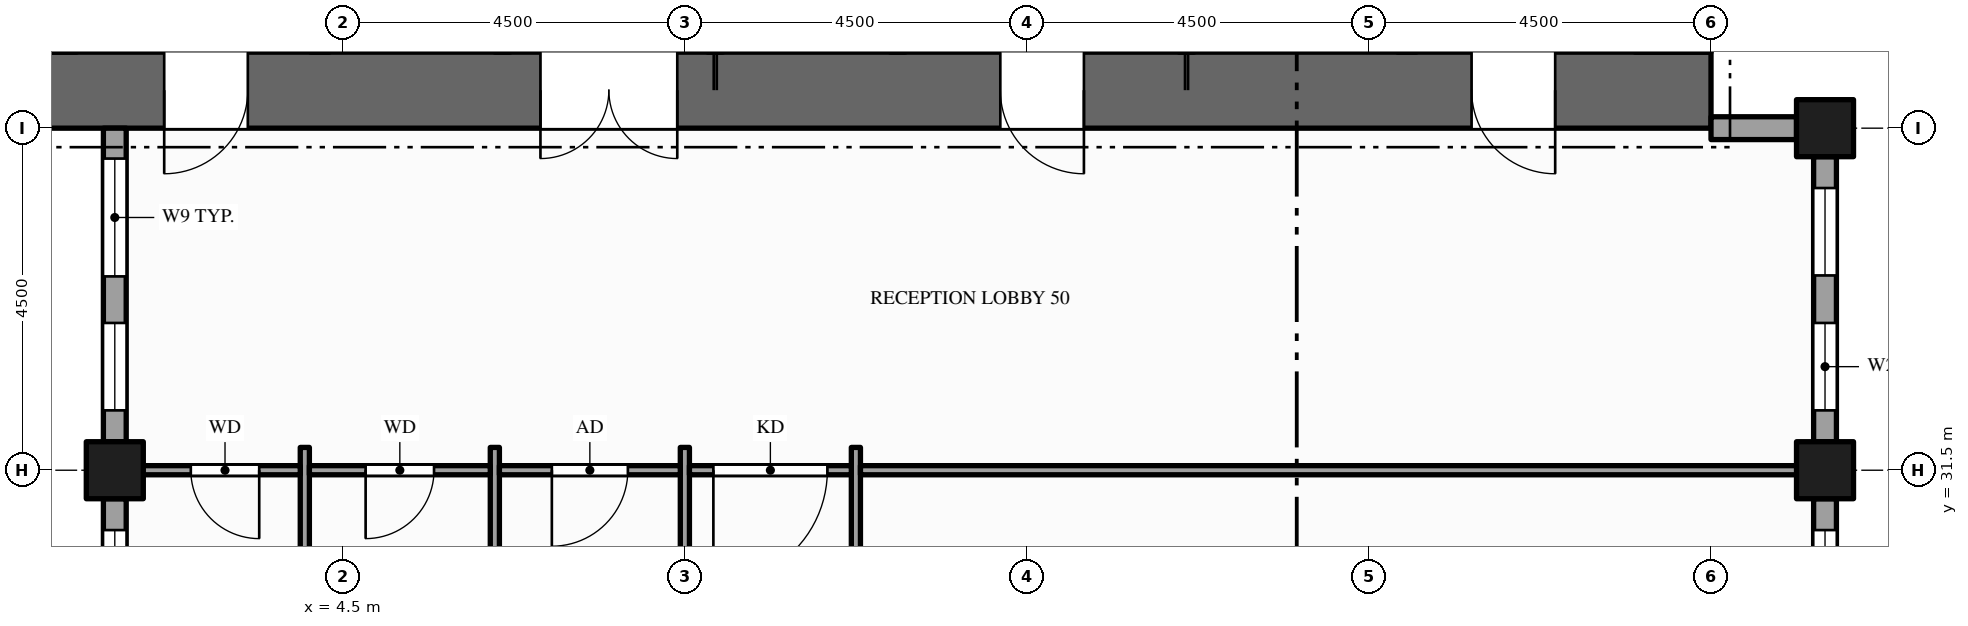
"""IFC4 building model, lengths in metres.
Left out: names, types, materials, properties, quantities, classifications, styles, units other than length and angle.
Written with IfcOpenShell. Run it as: python <this file> out.ifc"""

import sys

from ifc_helpers import new_model, si_unit, direction, frame, frame_2d, origin, origin_2d, place, context, subcontext, project, spatial, rectangle, hollow_rectangle, extrude, element, fill, save


model = new_model("IFC4")
c1 = context("Model", 3, precision=1e-05, world=origin(), true_north=direction((0.0, 1.0)))
c2 = subcontext(c1, "Body", "Model", "MODEL_VIEW")
j1 = project(units=[si_unit("LENGTHUNIT", "METRE"), si_unit("PLANEANGLEUNIT", "RADIAN")], contexts=[c1])
p1 = place(None, origin())
s1 = spatial("IfcSite", under=j1, at=p1, CompositionType="ELEMENT")
p2 = place(p1, origin())
s2 = spatial("IfcBuilding", under=s1, at=p2, CompositionType="ELEMENT")
p3 = place(p2, frame((0.0, 0.0, 215.0)))
s3 = spatial("IfcBuildingStorey", under=s2, at=p3, CompositionType="ELEMENT", Elevation=215.0)
p4 = place(p3, frame((0.0, 36.5, -0.15), z_axis=(0.0, 0.0, 1.0), x_axis=(1.0, 0.0, 0.0)))
e1 = element("IfcWall", 1, at=p4, inside=s3, PredefinedType="SHEAR", context=c2, shape_type="SweptSolid", body=[
    extrude(rectangle(XDim=22.5, YDim=1.0, at=frame_2d((11.25, 0.0))), origin(), (0.0, 0.0, 1.0), 4.0),
])
p5 = place(p4, frame((7.1, 0.0, 0.15)))
e2 = element("IfcOpeningElement", 2, at=p5, cuts=e1, PredefinedType="OPENING", context=c2, shape_type="SweptSolid", body=[
    extrude(rectangle(XDim=1.8, YDim=2.1, at=frame_2d((0.9, 1.05))), frame((0.0, 0.51, 0.0), z_axis=(0.0, -1.0, 0.0), x_axis=(1.0, 0.0, 0.0)), (0.0, 0.0, 1.0), 1.02),
])
p6 = place(p4, frame((13.15, 0.0, 0.15)))
e3 = element("IfcOpeningElement", 3, at=p6, cuts=e1, PredefinedType="OPENING", context=c2, shape_type="SweptSolid", body=[
    extrude(rectangle(XDim=1.1, YDim=2.1, at=frame_2d((0.55, 1.05))), frame((0.0, 0.51, 0.0), z_axis=(0.0, -1.0, 0.0), x_axis=(1.0, 0.0, 0.0)), (0.0, 0.0, 1.0), 1.02),
])
p7 = place(p4, frame((2.15, 0.0, 0.15)))
e4 = element("IfcOpeningElement", 4, at=p7, cuts=e1, PredefinedType="OPENING", context=c2, shape_type="SweptSolid", body=[
    extrude(rectangle(XDim=1.1, YDim=2.1, at=frame_2d((0.55, 1.05))), frame((0.0, 0.51, 0.0), z_axis=(0.0, -1.0, 0.0), x_axis=(1.0, 0.0, 0.0)), (0.0, 0.0, 1.0), 1.02),
])
p8 = place(p4, frame((19.35, 0.0, 0.15)))
e5 = element("IfcOpeningElement", 5, at=p8, cuts=e1, PredefinedType="OPENING", context=c2, shape_type="SweptSolid", body=[
    extrude(rectangle(XDim=1.1, YDim=2.1, at=frame_2d((0.55, 1.05))), frame((0.0, 0.51, 0.0), z_axis=(0.0, -1.0, 0.0), x_axis=(1.0, 0.0, 0.0)), (0.0, 0.0, 1.0), 1.02),
])
for number, where, z_axis, x_axis in (
    (6, (1.5, 31.5, -0.15), (0.0, 0.0, 1.0), (1.0, 0.0, 0.0)),
    (7, (24.0, 31.5, -0.15), (0.0, 0.0, 1.0), (1.0, 0.0, 0.0)),
    (8, (24.0, 36.0, -0.15), (0.0, 0.0, 1.0), (1.0, 0.0, 0.0)),
):
    element("IfcColumn", number, at=place(p3, frame(where, z_axis=z_axis, x_axis=x_axis)), inside=s3, PredefinedType="COLUMN", context=c2, shape_type="SweptSolid", body=[
        extrude(hollow_rectangle(XDim=0.75, YDim=0.75, WallThickness=0.036, at=origin_2d()), origin(), (0.0, 0.0, 1.0), 4.0),
    ])
p9 = place(p3, frame((24.0, 25.875, 0.0), z_axis=(0.0, 0.0, 1.0), x_axis=(0.0, 1.0, 0.0)))
e9 = element("IfcWall", 9, at=p9, inside=s3, PredefinedType="STANDARD", context=c2, shape_type="SweptSolid", body=[
    extrude(rectangle(XDim=5.25, YDim=0.3, at=frame_2d((2.625, 0.0))), origin(), (0.0, 0.0, 1.0), 3.157),
])
p10 = place(p9, frame((1.425, 0.0, 0.9)))
e10 = element("IfcOpeningElement", 10, at=p10, cuts=e9, PredefinedType="OPENING", context=c2, shape_type="SweptSolid", body=[
    extrude(rectangle(XDim=1.65, YDim=2.0, at=frame_2d((0.825, 1.0))), frame((0.0, 0.16, 0.0), z_axis=(0.0, -1.0, 0.0), x_axis=(1.0, 0.0, 0.0)), (0.0, 0.0, 1.0), 0.32),
])
p11 = place(p9, frame((3.688, 0.0, 0.9)))
e11 = element("IfcOpeningElement", 11, at=p11, cuts=e9, PredefinedType="OPENING", context=c2, shape_type="SweptSolid", body=[
    extrude(rectangle(XDim=1.15, YDim=2.0, at=frame_2d((0.575, 1.0))), frame((0.0, 0.16, 0.0), z_axis=(0.0, -1.0, 0.0), x_axis=(1.0, 0.0, 0.0)), (0.0, 0.0, 1.0), 0.32),
])
p12 = place(p3, frame((24.0, 31.875, 0.0), z_axis=(0.0, 0.0, 1.0), x_axis=(0.0, 1.0, 0.0)))
e12 = element("IfcWall", 12, at=p12, inside=s3, PredefinedType="STANDARD", context=c2, shape_type="SweptSolid", body=[
    extrude(rectangle(XDim=3.75, YDim=0.3, at=frame_2d((1.875, 0.0))), origin(), (0.0, 0.0, 1.0), 3.157),
])
p13 = place(p12, frame((0.413, 0.0, 0.9)))
e13 = element("IfcOpeningElement", 13, at=p13, cuts=e12, PredefinedType="OPENING", context=c2, shape_type="SweptSolid", body=[
    extrude(rectangle(XDim=1.15, YDim=2.0, at=frame_2d((0.575, 1.0))), frame((0.0, 0.16, 0.0), z_axis=(0.0, -1.0, 0.0), x_axis=(1.0, 0.0, 0.0)), (0.0, 0.0, 1.0), 0.32),
])
p14 = place(p12, frame((2.188, 0.0, 0.9)))
e14 = element("IfcOpeningElement", 14, at=p14, cuts=e12, PredefinedType="OPENING", context=c2, shape_type="SweptSolid", body=[
    extrude(rectangle(XDim=1.15, YDim=2.0, at=frame_2d((0.575, 1.0))), frame((0.0, 0.16, 0.0), z_axis=(0.0, -1.0, 0.0), x_axis=(1.0, 0.0, 0.0)), (0.0, 0.0, 1.0), 0.32),
])
p15 = place(p3, frame((23.625, 36.0, 0.0), z_axis=(0.0, 0.0, 1.0), x_axis=(-1.0, 0.0, 0.0)))
e15 = element("IfcWall", 15, at=p15, inside=s3, PredefinedType="STANDARD", context=c2, shape_type="SweptSolid", body=[
    extrude(rectangle(XDim=1.125, YDim=0.3, at=frame_2d((0.562, 0.0))), origin(), (0.0, 0.0, 1.0), 2.87),
])
p16 = place(p3, frame((1.5, 36.0, 0.0), z_axis=(0.0, 0.0, 1.0), x_axis=(0.0, -1.0, 0.0)))
e16 = element("IfcWall", 16, at=p16, inside=s3, PredefinedType="STANDARD", context=c2, shape_type="SweptSolid", body=[
    extrude(rectangle(XDim=4.125, YDim=0.3, at=frame_2d((2.062, 0.0))), origin(), (0.0, 0.0, 1.0), 3.157),
])
p17 = place(p16, frame((0.4, 0.0, 0.9)))
e17 = element("IfcOpeningElement", 17, at=p17, cuts=e16, PredefinedType="OPENING", context=c2, shape_type="SweptSolid", body=[
    extrude(rectangle(XDim=1.55, YDim=2.0, at=frame_2d((0.775, 1.0))), frame((0.0, 0.16, 0.0), z_axis=(0.0, -1.0, 0.0), x_axis=(1.0, 0.0, 0.0)), (0.0, 0.0, 1.0), 0.32),
])
p18 = place(p16, frame((2.562, 0.0, 0.9)))
e18 = element("IfcOpeningElement", 18, at=p18, cuts=e16, PredefinedType="OPENING", context=c2, shape_type="SweptSolid", body=[
    extrude(rectangle(XDim=1.15, YDim=2.0, at=frame_2d((0.575, 1.0))), frame((0.0, 0.16, 0.0), z_axis=(0.0, -1.0, 0.0), x_axis=(1.0, 0.0, 0.0)), (0.0, 0.0, 1.0), 0.32),
])
p19 = place(p3, frame((1.5, 31.125, 0.0), z_axis=(0.0, 0.0, 1.0), x_axis=(0.0, -1.0, 0.0)))
e19 = element("IfcWall", 19, at=p19, inside=s3, PredefinedType="STANDARD", context=c2, shape_type="SweptSolid", body=[
    extrude(rectangle(XDim=3.75, YDim=0.3, at=frame_2d((1.875, 0.0))), origin(), (0.0, 0.0, 1.0), 3.157),
])
p20 = place(p19, frame((0.413, 0.0, 0.9)))
e20 = element("IfcOpeningElement", 20, at=p20, cuts=e19, PredefinedType="OPENING", context=c2, shape_type="SweptSolid", body=[
    extrude(rectangle(XDim=1.15, YDim=2.0, at=frame_2d((0.575, 1.0))), frame((0.0, 0.16, 0.0), z_axis=(0.0, -1.0, 0.0), x_axis=(1.0, 0.0, 0.0)), (0.0, 0.0, 1.0), 0.32),
])
p21 = place(p19, frame((2.188, 0.0, 0.9)))
e21 = element("IfcOpeningElement", 21, at=p21, cuts=e19, PredefinedType="OPENING", context=c2, shape_type="SweptSolid", body=[
    extrude(rectangle(XDim=1.15, YDim=2.0, at=frame_2d((0.575, 1.0))), frame((0.0, 0.16, 0.0), z_axis=(0.0, -1.0, 0.0), x_axis=(1.0, 0.0, 0.0)), (0.0, 0.0, 1.0), 0.32),
])
for number, where, z_axis, x_axis in (
    (22, (4.0, 26.7, 0.0), (0.0, 0.0, 1.0), (0.0, 1.0, 0.0)),
    (23, (6.5, 26.7, 0.0), (0.0, 0.0, 1.0), (0.0, 1.0, 0.0)),
):
    element("IfcWall", number, at=place(p3, frame(where, z_axis=z_axis, x_axis=x_axis)), inside=s3, PredefinedType="PARTITIONING", context=c2, shape_type="SweptSolid", body=[
        extrude(rectangle(XDim=5.1, YDim=0.12, at=frame_2d((2.55, 0.0))), origin(), (0.0, 0.0, 1.0), 3.85),
    ])
p22 = place(p3, frame((9.0, 8.7, 0.0), z_axis=(0.0, 0.0, 1.0), x_axis=(0.0, 1.0, 0.0)))
e24 = element("IfcWall", 24, at=p22, inside=s3, PredefinedType="PARTITIONING", context=c2, shape_type="SweptSolid", body=[
    extrude(rectangle(XDim=23.1, YDim=0.12, at=frame_2d((11.55, 0.0))), origin(), (0.0, 0.0, 1.0), 2.6),
])
p23 = place(p22, frame((2.05, 0.0, 0.0)))
e25 = element("IfcOpeningElement", 25, at=p23, cuts=e24, PredefinedType="OPENING", context=c2, shape_type="SweptSolid", body=[
    extrude(rectangle(XDim=1.0, YDim=2.1, at=frame_2d((0.5, 1.05))), frame((0.0, 0.07, 0.0), z_axis=(0.0, -1.0, 0.0), x_axis=(1.0, 0.0, 0.0)), (0.0, 0.0, 1.0), 0.14),
])
p24 = place(p22, frame((7.675, 0.0, 0.0)))
e26 = element("IfcOpeningElement", 26, at=p24, cuts=e24, PredefinedType="OPENING", context=c2, shape_type="SweptSolid", body=[
    extrude(rectangle(XDim=1.0, YDim=2.1, at=frame_2d((0.5, 1.05))), frame((0.0, 0.07, 0.0), z_axis=(0.0, -1.0, 0.0), x_axis=(1.0, 0.0, 0.0)), (0.0, 0.0, 1.0), 0.14),
])
p25 = place(p22, frame((14.455, 0.0, 0.0)))
e27 = element("IfcOpeningElement", 27, at=p25, cuts=e24, PredefinedType="OPENING", context=c2, shape_type="SweptSolid", body=[
    extrude(rectangle(XDim=1.0, YDim=2.1, at=frame_2d((0.5, 1.05))), frame((0.0, 0.07, 0.0), z_axis=(0.0, -1.0, 0.0), x_axis=(1.0, 0.0, 0.0)), (0.0, 0.0, 1.0), 0.14),
])
p26 = place(p3, frame((11.25, 8.7, 0.0), z_axis=(0.0, 0.0, 1.0), x_axis=(0.0, 1.0, 0.0)))
e28 = element("IfcWall", 28, at=p26, inside=s3, PredefinedType="PARTITIONING", context=c2, shape_type="SweptSolid", body=[
    extrude(rectangle(XDim=23.1, YDim=0.12, at=frame_2d((11.55, 0.0))), origin(), (0.0, 0.0, 1.0), 2.6),
])
p27 = place(p26, frame((18.825, 0.0, 0.0)))
e29 = element("IfcOpeningElement", 29, at=p27, cuts=e28, PredefinedType="OPENING", context=c2, shape_type="SweptSolid", body=[
    extrude(rectangle(XDim=1.2, YDim=2.1, at=frame_2d((0.6, 1.05))), frame((0.0, 0.07, 0.0), z_axis=(0.0, -1.0, 0.0), x_axis=(1.0, 0.0, 0.0)), (0.0, 0.0, 1.0), 0.14),
])
p28 = place(p26, frame((4.2, 0.0, 0.0)))
e30 = element("IfcOpeningElement", 30, at=p28, cuts=e28, PredefinedType="OPENING", context=c2, shape_type="SweptSolid", body=[
    extrude(rectangle(XDim=1.2, YDim=2.1, at=frame_2d((0.6, 1.05))), frame((0.0, 0.07, 0.0), z_axis=(0.0, -1.0, 0.0), x_axis=(1.0, 0.0, 0.0)), (0.0, 0.0, 1.0), 0.14),
])
p29 = place(p3, frame((1.65, 31.5, 0.0), z_axis=(0.0, 0.0, 1.0), x_axis=(1.0, 0.0, 0.0)))
e31 = element("IfcWall", 31, at=p29, inside=s3, PredefinedType="PARTITIONING", context=c2, shape_type="SweptSolid", body=[
    extrude(rectangle(XDim=2.29, YDim=0.12, at=frame_2d((1.145, 0.0))), origin(), (0.0, 0.0, 1.0), 2.87),
])
p30 = place(p29, frame((0.85, 0.0, 0.0)))
e32 = element("IfcOpeningElement", 32, at=p30, cuts=e31, PredefinedType="OPENING", context=c2, shape_type="SweptSolid", body=[
    extrude(rectangle(XDim=0.9, YDim=2.1, at=frame_2d((0.45, 1.05))), frame((0.0, 0.07, 0.0), z_axis=(0.0, -1.0, 0.0), x_axis=(1.0, 0.0, 0.0)), (0.0, 0.0, 1.0), 0.14),
])
p31 = place(p3, frame((4.06, 31.5, 0.0), z_axis=(0.0, 0.0, 1.0), x_axis=(1.0, 0.0, 0.0)))
e33 = element("IfcWall", 33, at=p31, inside=s3, PredefinedType="PARTITIONING", context=c2, shape_type="SweptSolid", body=[
    extrude(rectangle(XDim=2.38, YDim=0.12, at=frame_2d((1.19, 0.0))), origin(), (0.0, 0.0, 1.0), 2.87),
])
p32 = place(p31, frame((0.74, 0.0, 0.0)))
e34 = element("IfcOpeningElement", 34, at=p32, cuts=e33, PredefinedType="OPENING", context=c2, shape_type="SweptSolid", body=[
    extrude(rectangle(XDim=0.9, YDim=2.1, at=frame_2d((0.45, 1.05))), frame((0.0, 0.07, 0.0), z_axis=(0.0, -1.0, 0.0), x_axis=(1.0, 0.0, 0.0)), (0.0, 0.0, 1.0), 0.14),
])
p33 = place(p3, frame((6.56, 31.5, 0.0), z_axis=(0.0, 0.0, 1.0), x_axis=(1.0, 0.0, 0.0)))
e35 = element("IfcWall", 35, at=p33, inside=s3, PredefinedType="PARTITIONING", context=c2, shape_type="SweptSolid", body=[
    extrude(rectangle(XDim=2.38, YDim=0.12, at=frame_2d((1.19, 0.0))), origin(), (0.0, 0.0, 1.0), 2.87),
])
p34 = place(p33, frame((0.69, 0.0, 0.0)))
e36 = element("IfcOpeningElement", 36, at=p34, cuts=e35, PredefinedType="OPENING", context=c2, shape_type="SweptSolid", body=[
    extrude(rectangle(XDim=1.0, YDim=2.1, at=frame_2d((0.5, 1.05))), frame((0.0, 0.07, 0.0), z_axis=(0.0, -1.0, 0.0), x_axis=(1.0, 0.0, 0.0)), (0.0, 0.0, 1.0), 0.14),
])
p35 = place(p3, frame((9.06, 31.5, 0.0), z_axis=(0.0, 0.0, 1.0), x_axis=(1.0, 0.0, 0.0)))
e37 = element("IfcWall", 37, at=p35, inside=s3, PredefinedType="PARTITIONING", context=c2, shape_type="SweptSolid", body=[
    extrude(rectangle(XDim=2.13, YDim=0.12, at=frame_2d((1.065, 0.0))), origin(), (0.0, 0.0, 1.0), 2.87),
])
p36 = place(p35, frame((0.315, 0.0, 0.0)))
e38 = element("IfcOpeningElement", 38, at=p36, cuts=e37, PredefinedType="OPENING", context=c2, shape_type="SweptSolid", body=[
    extrude(rectangle(XDim=1.5, YDim=2.1, at=frame_2d((0.75, 1.05))), frame((0.0, 0.07, 0.0), z_axis=(0.0, -1.0, 0.0), x_axis=(1.0, 0.0, 0.0)), (0.0, 0.0, 1.0), 0.14),
])
p37 = place(p3, frame((11.31, 31.5, 0.0), z_axis=(0.0, 0.0, 1.0), x_axis=(1.0, 0.0, 0.0)))
e39 = element("IfcWall", 39, at=p37, inside=s3, PredefinedType="PARTITIONING", context=c2, shape_type="SweptSolid", body=[
    extrude(rectangle(XDim=12.54, YDim=0.12, at=frame_2d((6.27, 0.0))), origin(), (0.0, 0.0, 1.0), 2.87),
])
p38 = place(p11, origin())
e40 = element("IfcWindow", 40, at=p38, inside=s3, PartitioningType="SINGLE_PANEL", PredefinedType="WINDOW", context=c2, shape_type="SweptSolid", body=[
    extrude(rectangle(XDim=1.15, YDim=2.0, at=frame_2d((0.575, 1.0))), frame((0.0, 0.03, 0.0), z_axis=(0.0, -1.0, 0.0), x_axis=(1.0, 0.0, 0.0)), (0.0, 0.0, 1.0), 0.06),
])
fill(e11, e40)
p39 = place(p13, origin())
e41 = element("IfcWindow", 41, at=p39, inside=s3, PartitioningType="SINGLE_PANEL", PredefinedType="WINDOW", context=c2, shape_type="SweptSolid", body=[
    extrude(rectangle(XDim=1.15, YDim=2.0, at=frame_2d((0.575, 1.0))), frame((0.0, 0.03, 0.0), z_axis=(0.0, -1.0, 0.0), x_axis=(1.0, 0.0, 0.0)), (0.0, 0.0, 1.0), 0.06),
])
fill(e13, e41)
p40 = place(p14, origin())
e42 = element("IfcWindow", 42, at=p40, inside=s3, PartitioningType="SINGLE_PANEL", PredefinedType="WINDOW", context=c2, shape_type="SweptSolid", body=[
    extrude(rectangle(XDim=1.15, YDim=2.0, at=frame_2d((0.575, 1.0))), frame((0.0, 0.03, 0.0), z_axis=(0.0, -1.0, 0.0), x_axis=(1.0, 0.0, 0.0)), (0.0, 0.0, 1.0), 0.06),
])
fill(e14, e42)
p41 = place(p17, origin())
e43 = element("IfcWindow", 43, at=p41, inside=s3, PartitioningType="SINGLE_PANEL", PredefinedType="WINDOW", context=c2, shape_type="SweptSolid", body=[
    extrude(rectangle(XDim=1.55, YDim=2.0, at=frame_2d((0.775, 1.0))), frame((0.0, 0.03, 0.0), z_axis=(0.0, -1.0, 0.0), x_axis=(1.0, 0.0, 0.0)), (0.0, 0.0, 1.0), 0.06),
])
fill(e17, e43)
p42 = place(p18, origin())
e44 = element("IfcWindow", 44, at=p42, inside=s3, PartitioningType="SINGLE_PANEL", PredefinedType="WINDOW", context=c2, shape_type="SweptSolid", body=[
    extrude(rectangle(XDim=1.15, YDim=2.0, at=frame_2d((0.575, 1.0))), frame((0.0, 0.03, 0.0), z_axis=(0.0, -1.0, 0.0), x_axis=(1.0, 0.0, 0.0)), (0.0, 0.0, 1.0), 0.06),
])
fill(e18, e44)
p43 = place(p20, origin())
e45 = element("IfcWindow", 45, at=p43, inside=s3, PartitioningType="SINGLE_PANEL", PredefinedType="WINDOW", context=c2, shape_type="SweptSolid", body=[
    extrude(rectangle(XDim=1.15, YDim=2.0, at=frame_2d((0.575, 1.0))), frame((0.0, 0.03, 0.0), z_axis=(0.0, -1.0, 0.0), x_axis=(1.0, 0.0, 0.0)), (0.0, 0.0, 1.0), 0.06),
])
fill(e20, e45)
p44 = place(p5, origin())
e46 = element("IfcDoor", 46, at=p44, inside=s3, OperationType="DOUBLE_DOOR_SINGLE_SWING", PredefinedType="DOOR", context=c2, shape_type="SweptSolid", body=[
    extrude(rectangle(XDim=1.8, YDim=2.1, at=frame_2d((0.9, 1.05))), frame((0.0, 0.025, 0.0), z_axis=(0.0, -1.0, 0.0), x_axis=(1.0, 0.0, 0.0)), (0.0, 0.0, 1.0), 0.05),
])
fill(e2, e46)
p45 = place(p6, origin())
e47 = element("IfcDoor", 47, at=p45, inside=s3, OperationType="SINGLE_SWING_RIGHT", PredefinedType="DOOR", context=c2, shape_type="SweptSolid", body=[
    extrude(rectangle(XDim=1.1, YDim=2.1, at=frame_2d((0.55, 1.05))), frame((0.0, 0.025, 0.0), z_axis=(0.0, -1.0, 0.0), x_axis=(1.0, 0.0, 0.0)), (0.0, 0.0, 1.0), 0.05),
])
fill(e3, e47)
p46 = place(p7, origin())
e48 = element("IfcDoor", 48, at=p46, inside=s3, OperationType="SINGLE_SWING_LEFT", PredefinedType="DOOR", context=c2, shape_type="SweptSolid", body=[
    extrude(rectangle(XDim=1.1, YDim=2.1, at=frame_2d((0.55, 1.05))), frame((0.0, 0.025, 0.0), z_axis=(0.0, -1.0, 0.0), x_axis=(1.0, 0.0, 0.0)), (0.0, 0.0, 1.0), 0.05),
])
fill(e4, e48)
p47 = place(p8, origin())
e49 = element("IfcDoor", 49, at=p47, inside=s3, OperationType="SINGLE_SWING_RIGHT", PredefinedType="DOOR", context=c2, shape_type="SweptSolid", body=[
    extrude(rectangle(XDim=1.1, YDim=2.1, at=frame_2d((0.55, 1.05))), frame((0.0, 0.025, 0.0), z_axis=(0.0, -1.0, 0.0), x_axis=(1.0, 0.0, 0.0)), (0.0, 0.0, 1.0), 0.05),
])
fill(e5, e49)
p48 = place(p36, origin())
e50 = element("IfcDoor", 50, at=p48, inside=s3, OperationType="SINGLE_SWING_LEFT", PredefinedType="DOOR", context=c2, shape_type="SweptSolid", body=[
    extrude(rectangle(XDim=1.5, YDim=2.1, at=frame_2d((0.75, 1.05))), frame((0.0, 0.025, 0.0), z_axis=(0.0, -1.0, 0.0), x_axis=(1.0, 0.0, 0.0)), (0.0, 0.0, 1.0), 0.05),
])
fill(e38, e50)
p49 = place(p30, origin())
e51 = element("IfcDoor", 51, at=p49, inside=s3, OperationType="SINGLE_SWING_RIGHT", PredefinedType="DOOR", context=c2, shape_type="SweptSolid", body=[
    extrude(rectangle(XDim=0.9, YDim=2.1, at=frame_2d((0.45, 1.05))), frame((0.0, 0.025, 0.0), z_axis=(0.0, -1.0, 0.0), x_axis=(1.0, 0.0, 0.0)), (0.0, 0.0, 1.0), 0.05),
])
fill(e32, e51)
p50 = place(p32, origin())
e52 = element("IfcDoor", 52, at=p50, inside=s3, OperationType="SINGLE_SWING_LEFT", PredefinedType="DOOR", context=c2, shape_type="SweptSolid", body=[
    extrude(rectangle(XDim=0.9, YDim=2.1, at=frame_2d((0.45, 1.05))), frame((0.0, 0.025, 0.0), z_axis=(0.0, -1.0, 0.0), x_axis=(1.0, 0.0, 0.0)), (0.0, 0.0, 1.0), 0.05),
])
fill(e34, e52)
p51 = place(p34, origin())
e53 = element("IfcDoor", 53, at=p51, inside=s3, OperationType="SINGLE_SWING_LEFT", PredefinedType="DOOR", context=c2, shape_type="SweptSolid", body=[
    extrude(rectangle(XDim=1.0, YDim=2.1, at=frame_2d((0.5, 1.05))), frame((0.0, 0.025, 0.0), z_axis=(0.0, -1.0, 0.0), x_axis=(1.0, 0.0, 0.0)), (0.0, 0.0, 1.0), 0.05),
])
fill(e36, e53)
save(model, sys.argv[1])
